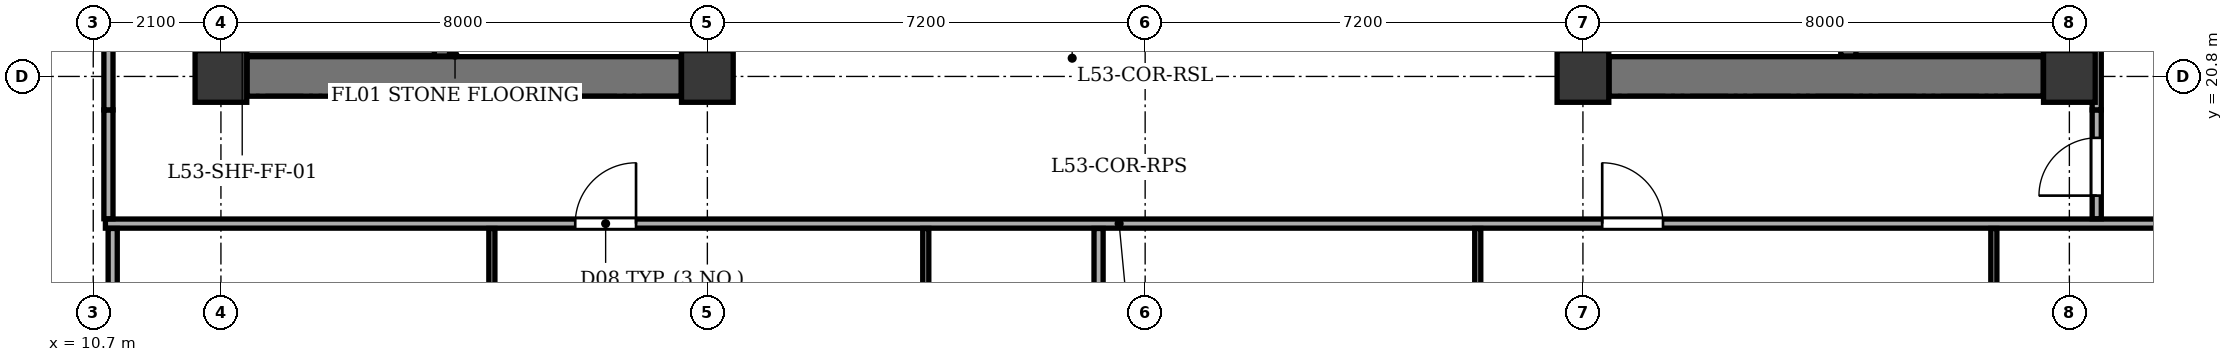
"""IFC4 building model, lengths in metres.
Left out: names, types, materials, properties, quantities, classifications, styles, units other than length and angle.
Written with IfcOpenShell. Run it as: python <this file> out.ifc"""

import sys

from ifc_helpers import new_model, si_unit, direction, frame, frame_2d, origin, origin_2d, place, context, subcontext, project, spatial, rectangle, extrude, element, fill, save


model = new_model("IFC4")
c1 = context("Model", 3, precision=1e-05, world=origin(), true_north=direction((0.0, 1.0)))
c2 = subcontext(c1, "Body", "Model", "MODEL_VIEW")
j1 = project(units=[si_unit("LENGTHUNIT", "METRE"), si_unit("PLANEANGLEUNIT", "RADIAN")], contexts=[c1])
p1 = place(None, origin())
s1 = spatial("IfcSite", under=j1, at=p1, CompositionType="ELEMENT")
p2 = place(p1, origin())
s2 = spatial("IfcBuilding", under=s1, at=p2, CompositionType="ELEMENT")
p3 = place(p2, frame((0.0, 0.0, 207.5)))
s3 = spatial("IfcBuildingStorey", under=s2, at=p3, CompositionType="ELEMENT", Elevation=207.5)
for number, where, z_axis, x_axis in (
    (1, (12.8, 20.8, 0.0), (0.0, 0.0, 1.0), (1.0, 0.0, 0.0)),
    (2, (20.8, 20.8, 0.0), (0.0, 0.0, 1.0), (1.0, 0.0, 0.0)),
    (3, (35.2, 20.8, 0.0), (0.0, 0.0, 1.0), (1.0, 0.0, 0.0)),
    (4, (43.2, 20.8, 0.0), (0.0, 0.0, 1.0), (1.0, 0.0, 0.0)),
):
    element("IfcColumn", number, at=place(p3, frame(where, z_axis=z_axis, x_axis=x_axis)), inside=s3, PredefinedType="COLUMN", context=c2, shape_type="SweptSolid", body=[
        extrude(rectangle(XDim=0.85, YDim=0.85, at=origin_2d()), origin(), (0.0, 0.0, 1.0), 3.4),
    ])
p4 = place(p3, frame((13.23, 20.8, 0.0), z_axis=(0.0, 0.0, 1.0), x_axis=(1.0, 0.0, 0.0)))
e5 = element("IfcWall", 5, at=p4, inside=s3, PredefinedType="SHEAR", context=c2, shape_type="SweptSolid", body=[
    extrude(rectangle(XDim=7.14, YDim=0.65, at=frame_2d((3.57, 0.0))), origin(), (0.0, 0.0, 1.0), 3.1),
])
p5 = place(p3, frame((16.435, 21.135, 0.0), z_axis=(0.0, 0.0, 1.0), x_axis=(0.0, 1.0, 0.0)))
e6 = element("IfcWall", 6, at=p5, inside=s3, PredefinedType="SHEAR", context=c2, shape_type="SweptSolid", body=[
    extrude(rectangle(XDim=12.13, YDim=0.25, at=frame_2d((6.065, 0.0))), origin(), (0.0, 0.0, 1.0), 3.1),
])
p6 = place(p5, frame((0.515, 0.0, 0.0)))
e7 = element("IfcOpeningElement", 7, at=p6, cuts=e6, PredefinedType="OPENING", context=c2, shape_type="SweptSolid", body=[
    extrude(rectangle(XDim=1.2, YDim=2.15, at=frame_2d((0.6, 1.075))), frame((0.0, 0.135, 0.0), z_axis=(0.0, -1.0, 0.0), x_axis=(1.0, 0.0, 0.0)), (0.0, 0.0, 1.0), 0.27),
])
p7 = place(p5, frame((2.665, 0.0, 0.0)))
e8 = element("IfcOpeningElement", 8, at=p7, cuts=e6, PredefinedType="OPENING", context=c2, shape_type="SweptSolid", body=[
    extrude(rectangle(XDim=1.15, YDim=2.15, at=frame_2d((0.575, 1.075))), frame((0.0, 0.135, 0.0), z_axis=(0.0, -1.0, 0.0), x_axis=(1.0, 0.0, 0.0)), (0.0, 0.0, 1.0), 0.27),
])
p8 = place(p3, frame((35.63, 20.8, 0.0), z_axis=(0.0, 0.0, 1.0), x_axis=(1.0, 0.0, 0.0)))
e9 = element("IfcWall", 9, at=p8, inside=s3, PredefinedType="SHEAR", context=c2, shape_type="SweptSolid", body=[
    extrude(rectangle(XDim=7.14, YDim=0.65, at=frame_2d((3.57, 0.0))), origin(), (0.0, 0.0, 1.0), 3.1),
])
p9 = place(p3, frame((39.565, 21.135, 0.0), z_axis=(0.0, 0.0, 1.0), x_axis=(0.0, 1.0, 0.0)))
e10 = element("IfcWall", 10, at=p9, inside=s3, PredefinedType="SHEAR", context=c2, shape_type="SweptSolid", body=[
    extrude(rectangle(XDim=12.13, YDim=0.25, at=frame_2d((6.065, 0.0))), origin(), (0.0, 0.0, 1.0), 3.1),
])
p10 = place(p9, frame((0.515, 0.0, 0.0)))
e11 = element("IfcOpeningElement", 11, at=p10, cuts=e10, PredefinedType="OPENING", context=c2, shape_type="SweptSolid", body=[
    extrude(rectangle(XDim=1.2, YDim=2.15, at=frame_2d((0.6, 1.075))), frame((0.0, 0.135, 0.0), z_axis=(0.0, -1.0, 0.0), x_axis=(1.0, 0.0, 0.0)), (0.0, 0.0, 1.0), 0.27),
])
p11 = place(p9, frame((2.665, 0.0, 0.0)))
e12 = element("IfcOpeningElement", 12, at=p11, cuts=e10, PredefinedType="OPENING", context=c2, shape_type="SweptSolid", body=[
    extrude(rectangle(XDim=1.15, YDim=2.15, at=frame_2d((0.575, 1.075))), frame((0.0, 0.135, 0.0), z_axis=(0.0, -1.0, 0.0), x_axis=(1.0, 0.0, 0.0)), (0.0, 0.0, 1.0), 0.27),
])
p12 = place(p3, frame((10.9, 18.38, 0.0), z_axis=(0.0, 0.0, 1.0), x_axis=(1.0, 0.0, 0.0)))
e13 = element("IfcWall", 13, at=p12, inside=s3, PredefinedType="PARTITIONING", context=c2, shape_type="SweptSolid", body=[
    extrude(rectangle(XDim=34.02, YDim=0.15, at=frame_2d((17.01, 0.0))), origin(), (0.0, 0.0, 1.0), 3.1),
])
p13 = place(p12, frame((7.727, 0.0, 0.0)))
e14 = element("IfcOpeningElement", 14, at=p13, cuts=e13, PredefinedType="OPENING", context=c2, shape_type="SweptSolid", body=[
    extrude(rectangle(XDim=1.0, YDim=2.1, at=frame_2d((0.5, 1.05))), frame((0.0, 0.085, 0.0), z_axis=(0.0, -1.0, 0.0), x_axis=(1.0, 0.0, 0.0)), (0.0, 0.0, 1.0), 0.17),
])
p14 = place(p12, frame((24.617, 0.0, 0.0)))
e15 = element("IfcOpeningElement", 15, at=p14, cuts=e13, PredefinedType="OPENING", context=c2, shape_type="SweptSolid", body=[
    extrude(rectangle(XDim=1.0, YDim=2.1, at=frame_2d((0.5, 1.05))), frame((0.0, 0.085, 0.0), z_axis=(0.0, -1.0, 0.0), x_axis=(1.0, 0.0, 0.0)), (0.0, 0.0, 1.0), 0.17),
])
p15 = place(p3, frame((11.02, 3.045, 0.0), z_axis=(0.0, 0.0, 1.0), x_axis=(0.0, 1.0, 0.0)))
e16 = element("IfcWall", 16, at=p15, inside=s3, PredefinedType="PARTITIONING", context=c2, shape_type="SweptSolid", body=[
    extrude(rectangle(XDim=15.255, YDim=0.15, at=frame_2d((7.627, 0.0))), origin(), (0.0, 0.0, 1.0), 3.1),
])
p16 = place(p3, frame((24.392, 5.605, 0.0), z_axis=(0.0, 0.0, 1.0), x_axis=(0.0, 1.0, 0.0)))
e17 = element("IfcWall", 17, at=p16, inside=s3, PredefinedType="PARTITIONING", context=c2, shape_type="SweptSolid", body=[
    extrude(rectangle(XDim=12.695, YDim=0.1, at=frame_2d((6.348, 0.0))), origin(), (0.0, 0.0, 1.0), 3.1),
])
p17 = place(p16, frame((5.91, 0.0, 0.0)))
e18 = element("IfcOpeningElement", 18, at=p17, cuts=e17, PredefinedType="OPENING", context=c2, shape_type="SweptSolid", body=[
    extrude(rectangle(XDim=0.9, YDim=2.05, at=frame_2d((0.45, 1.025))), frame((0.0, 0.06, 0.0), z_axis=(0.0, -1.0, 0.0), x_axis=(1.0, 0.0, 0.0)), (0.0, 0.0, 1.0), 0.12),
])
p18 = place(p3, frame((17.256, 5.605, 0.0), z_axis=(0.0, 0.0, 1.0), x_axis=(0.0, 1.0, 0.0)))
e19 = element("IfcWall", 19, at=p18, inside=s3, PredefinedType="PARTITIONING", context=c2, shape_type="SweptSolid", body=[
    extrude(rectangle(XDim=12.695, YDim=0.1, at=frame_2d((6.348, 0.0))), origin(), (0.0, 0.0, 1.0), 3.1),
])
p19 = place(p18, frame((0.605, 0.0, 0.0)))
e20 = element("IfcOpeningElement", 20, at=p19, cuts=e19, PredefinedType="OPENING", context=c2, shape_type="SweptSolid", body=[
    extrude(rectangle(XDim=0.9, YDim=2.05, at=frame_2d((0.45, 1.025))), frame((0.0, 0.06, 0.0), z_axis=(0.0, -1.0, 0.0), x_axis=(1.0, 0.0, 0.0)), (0.0, 0.0, 1.0), 0.12),
])
p20 = place(p3, frame((27.234, 3.045, 0.0), z_axis=(0.0, 0.0, 1.0), x_axis=(0.0, 1.0, 0.0)))
e21 = element("IfcWall", 21, at=p20, inside=s3, PredefinedType="PARTITIONING", context=c2, shape_type="SweptSolid", body=[
    extrude(rectangle(XDim=15.255, YDim=0.15, at=frame_2d((7.627, 0.0))), origin(), (0.0, 0.0, 1.0), 3.1),
])
p21 = place(p3, frame((41.958, 5.605, 0.0), z_axis=(0.0, 0.0, 1.0), x_axis=(0.0, 1.0, 0.0)))
e22 = element("IfcWall", 22, at=p21, inside=s3, PredefinedType="PARTITIONING", context=c2, shape_type="SweptSolid", body=[
    extrude(rectangle(XDim=12.695, YDim=0.1, at=frame_2d((6.348, 0.0))), origin(), (0.0, 0.0, 1.0), 2.725),
])
p22 = place(p21, frame((5.91, 0.0, 0.0)))
e23 = element("IfcOpeningElement", 23, at=p22, cuts=e22, PredefinedType="OPENING", context=c2, shape_type="SweptSolid", body=[
    extrude(rectangle(XDim=0.9, YDim=2.05, at=frame_2d((0.45, 1.025))), frame((0.0, 0.06, 0.0), z_axis=(0.0, -1.0, 0.0), x_axis=(1.0, 0.0, 0.0)), (0.0, 0.0, 1.0), 0.12),
])
p23 = place(p3, frame((33.47, 5.605, 0.0), z_axis=(0.0, 0.0, 1.0), x_axis=(0.0, 1.0, 0.0)))
e24 = element("IfcWall", 24, at=p23, inside=s3, PredefinedType="PARTITIONING", context=c2, shape_type="SweptSolid", body=[
    extrude(rectangle(XDim=12.695, YDim=0.1, at=frame_2d((6.348, 0.0))), origin(), (0.0, 0.0, 1.0), 2.725),
])
p24 = place(p23, frame((0.605, 0.0, 0.0)))
e25 = element("IfcOpeningElement", 25, at=p24, cuts=e24, PredefinedType="OPENING", context=c2, shape_type="SweptSolid", body=[
    extrude(rectangle(XDim=0.9, YDim=2.05, at=frame_2d((0.45, 1.025))), frame((0.0, 0.06, 0.0), z_axis=(0.0, -1.0, 0.0), x_axis=(1.0, 0.0, 0.0)), (0.0, 0.0, 1.0), 0.12),
])
p25 = place(p3, frame((10.95, 18.46, 0.0), z_axis=(0.0, 0.0, 1.0), x_axis=(0.0, 1.0, 0.0)))
e26 = element("IfcWall", 26, at=p25, inside=s3, PredefinedType="PARTITIONING", context=c2, shape_type="SweptSolid", body=[
    extrude(rectangle(XDim=1.79, YDim=0.15, at=frame_2d((0.895, 0.0))), origin(), (0.0, 0.0, 1.0), 3.1),
])
p26 = place(p3, frame((10.95, 20.25, 0.0), z_axis=(0.0, 0.0, 1.0), x_axis=(0.0, 1.0, 0.0)))
e27 = element("IfcWall", 27, at=p26, inside=s3, PredefinedType="PARTITIONING", context=c2, shape_type="SweptSolid", body=[
    extrude(rectangle(XDim=13.9, YDim=0.15, at=frame_2d((6.95, 0.0))), origin(), (0.0, 0.0, 1.0), 3.1),
])
p27 = place(p3, frame((43.65, 18.46, 0.0), z_axis=(0.0, 0.0, 1.0), x_axis=(0.0, 1.0, 0.0)))
e28 = element("IfcWall", 28, at=p27, inside=s3, PredefinedType="PARTITIONING", context=c2, shape_type="SweptSolid", body=[
    extrude(rectangle(XDim=1.79, YDim=0.15, at=frame_2d((0.895, 0.0))), origin(), (0.0, 0.0, 1.0), 3.1),
])
p28 = place(p27, frame((0.38, 0.0, 0.0)))
e29 = element("IfcOpeningElement", 29, at=p28, cuts=e28, PredefinedType="OPENING", context=c2, shape_type="SweptSolid", body=[
    extrude(rectangle(XDim=0.95, YDim=2.1, at=frame_2d((0.475, 1.05))), frame((0.0, 0.085, 0.0), z_axis=(0.0, -1.0, 0.0), x_axis=(1.0, 0.0, 0.0)), (0.0, 0.0, 1.0), 0.17),
])
p29 = place(p3, frame((43.65, 20.25, 0.0), z_axis=(0.0, 0.0, 1.0), x_axis=(0.0, 1.0, 0.0)))
e30 = element("IfcWall", 30, at=p29, inside=s3, PredefinedType="PARTITIONING", context=c2, shape_type="SweptSolid", body=[
    extrude(rectangle(XDim=13.27, YDim=0.15, at=frame_2d((6.635, 0.0))), origin(), (0.0, 0.0, 1.0), 3.1),
])
p30 = place(p13, origin())
e31 = element("IfcDoor", 31, at=p30, inside=s3, OperationType="SINGLE_SWING_RIGHT", PredefinedType="DOOR", context=c2, shape_type="SweptSolid", body=[
    extrude(rectangle(XDim=1.0, YDim=2.1, at=frame_2d((0.5, 1.05))), frame((0.0, 0.025, 0.0), z_axis=(0.0, -1.0, 0.0), x_axis=(1.0, 0.0, 0.0)), (0.0, 0.0, 1.0), 0.05),
])
fill(e14, e31)
p31 = place(p14, origin())
e32 = element("IfcDoor", 32, at=p31, inside=s3, OperationType="SINGLE_SWING_LEFT", PredefinedType="DOOR", context=c2, shape_type="SweptSolid", body=[
    extrude(rectangle(XDim=1.0, YDim=2.1, at=frame_2d((0.5, 1.05))), frame((0.0, 0.025, 0.0), z_axis=(0.0, -1.0, 0.0), x_axis=(1.0, 0.0, 0.0)), (0.0, 0.0, 1.0), 0.05),
])
fill(e15, e32)
p32 = place(p28, origin())
e33 = element("IfcDoor", 33, at=p32, inside=s3, OperationType="SINGLE_SWING_LEFT", PredefinedType="DOOR", context=c2, shape_type="SweptSolid", body=[
    extrude(rectangle(XDim=0.95, YDim=2.1, at=frame_2d((0.475, 1.05))), frame((0.0, 0.025, 0.0), z_axis=(0.0, -1.0, 0.0), x_axis=(1.0, 0.0, 0.0)), (0.0, 0.0, 1.0), 0.05),
])
fill(e29, e33)
save(model, sys.argv[1])
